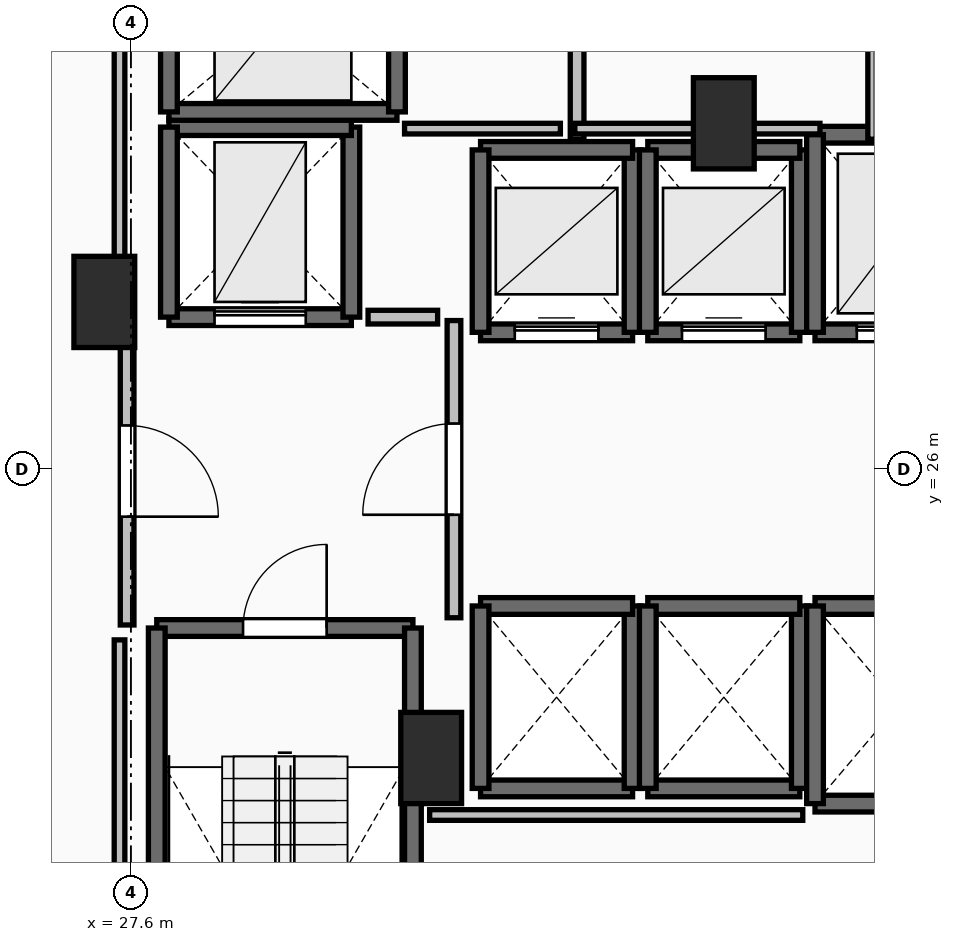
"""IFC4 building model, lengths in metres.
Left out: names, types, materials, properties, quantities, classifications, styles, units other than length and angle.
Written with IfcOpenShell. Run it as: python <this file> out.ifc"""

import sys

from ifc_helpers import new_model, si_unit, direction, frame, frame_2d, origin, origin_2d, place, context, subcontext, project, spatial, rectangle, extrude, element, fill, save


model = new_model("IFC4")
c1 = context("Model", 3, precision=1e-05, world=origin(), true_north=direction((0.0, 1.0)))
c2 = subcontext(c1, "Body", "Model", "MODEL_VIEW")
j1 = project(units=[si_unit("LENGTHUNIT", "METRE"), si_unit("PLANEANGLEUNIT", "RADIAN")], contexts=[c1])
p1 = place(None, origin())
s1 = spatial("IfcSite", under=j1, at=p1, CompositionType="ELEMENT")
p2 = place(p1, origin())
s2 = spatial("IfcBuilding", under=s1, at=p2, CompositionType="ELEMENT")
p3 = place(p2, frame((0.0, 0.0, 92.8)))
s3 = spatial("IfcBuildingStorey", under=s2, at=p3, CompositionType="ELEMENT", Elevation=92.8)
for number, where, z_axis, x_axis in (
    (1, (27.25, 28.2, 0.0), (0.0, 0.0, 1.0), (1.0, 0.0, 0.0)),
    (2, (31.55, 22.2, 0.0), (0.0, 0.0, 1.0), (1.0, 0.0, 0.0)),
    (3, (35.4, 30.55, 0.0), (0.0, 0.0, 1.0), (1.0, 0.0, 0.0)),
):
    element("IfcColumn", number, at=place(p3, frame(where, z_axis=z_axis, x_axis=x_axis)), inside=s3, PredefinedType="PILASTER", context=c2, shape_type="SweptSolid", body=[
        extrude(rectangle(XDim=0.8, YDim=1.2, at=origin_2d()), origin(), (0.0, 0.0, 1.0), 3.5),
    ])
p4 = place(p3, frame((27.94, 23.91, 0.0), z_axis=(0.0, 0.0, 1.0), x_axis=(1.0, 0.0, 0.0)))
e4 = element("IfcWall", 4, at=p4, inside=s3, PredefinedType="SOLIDWALL", context=c2, shape_type="SweptSolid", body=[
    extrude(rectangle(XDim=3.37, YDim=0.22, at=frame_2d((1.685, 0.0))), origin(), (0.0, 0.0, 1.0), 3.24),
])
p5 = place(p4, frame((1.135, 0.0, 0.0)))
e5 = element("IfcOpeningElement", 5, at=p5, cuts=e4, PredefinedType="OPENING", context=c2, shape_type="SweptSolid", body=[
    extrude(rectangle(XDim=1.1, YDim=2.15, at=frame_2d((0.55, 1.075))), frame((0.0, 0.125, 0.0), z_axis=(0.0, -1.0, 0.0), x_axis=(1.0, 0.0, 0.0)), (0.0, 0.0, 1.0), 0.25),
])
for number, where, z_axis, x_axis in (
    (6, (31.31, 23.91, 0.0), (0.0, 0.0, 1.0), (0.0, -1.0, 0.0)),
    (7, (27.94, 16.49, 0.0), (0.0, 0.0, 1.0), (0.0, 1.0, 0.0)),
):
    element("IfcWall", number, at=place(p3, frame(where, z_axis=z_axis, x_axis=x_axis)), inside=s3, PredefinedType="SOLIDWALL", context=c2, shape_type="SweptSolid", body=[
        extrude(rectangle(XDim=7.42, YDim=0.22, at=frame_2d((3.71, 0.0))), origin(), (0.0, 0.0, 1.0), 3.24),
    ])
p6 = place(p3, frame((32.2, 27.8, 0.0), z_axis=(0.0, 0.0, 1.0), x_axis=(1.0, 0.0, 0.0)))
e8 = element("IfcWall", 8, at=p6, inside=s3, PredefinedType="SOLIDWALL", context=c2, shape_type="SweptSolid", body=[
    extrude(rectangle(XDim=2.0, YDim=0.22, at=frame_2d((1.0, 0.0))), origin(), (0.0, 0.0, 1.0), 3.24),
])
p7 = place(p6, frame((0.45, 0.0, 0.0)))
e9 = element("IfcOpeningElement", 9, at=p7, cuts=e8, PredefinedType="OPENING", context=c2, shape_type="SweptSolid", body=[
    extrude(rectangle(XDim=1.1, YDim=2.2, at=frame_2d((0.55, 1.1))), frame((0.0, 0.125, 0.0), z_axis=(0.0, -1.0, 0.0), x_axis=(1.0, 0.0, 0.0)), (0.0, 0.0, 1.0), 0.25),
])
p8 = place(p3, frame((34.2, 27.8, 0.0), z_axis=(0.0, 0.0, 1.0), x_axis=(0.0, 1.0, 0.0)))
e10 = element("IfcWall", 10, at=p8, inside=s3, PredefinedType="SOLIDWALL", context=c2, shape_type="SweptSolid", body=[
    extrude(rectangle(XDim=2.4, YDim=0.22, at=frame_2d((1.2, 0.0))), origin(), (0.0, 0.0, 1.0), 3.24),
])
p9 = place(p3, frame((34.2, 30.2, 0.0), z_axis=(0.0, 0.0, 1.0), x_axis=(-1.0, 0.0, 0.0)))
e11 = element("IfcWall", 11, at=p9, inside=s3, PredefinedType="SOLIDWALL", context=c2, shape_type="SweptSolid", body=[
    extrude(rectangle(XDim=2.0, YDim=0.22, at=frame_2d((1.0, 0.0))), origin(), (0.0, 0.0, 1.0), 3.24),
])
p10 = place(p3, frame((32.2, 30.2, 0.0), z_axis=(0.0, 0.0, 1.0), x_axis=(0.0, -1.0, 0.0)))
e12 = element("IfcWall", 12, at=p10, inside=s3, PredefinedType="SOLIDWALL", context=c2, shape_type="SweptSolid", body=[
    extrude(rectangle(XDim=2.4, YDim=0.22, at=frame_2d((1.2, 0.0))), origin(), (0.0, 0.0, 1.0), 3.24),
])
p11 = place(p3, frame((34.4, 27.8, 0.0), z_axis=(0.0, 0.0, 1.0), x_axis=(1.0, 0.0, 0.0)))
e13 = element("IfcWall", 13, at=p11, inside=s3, PredefinedType="SOLIDWALL", context=c2, shape_type="SweptSolid", body=[
    extrude(rectangle(XDim=2.0, YDim=0.22, at=frame_2d((1.0, 0.0))), origin(), (0.0, 0.0, 1.0), 3.24),
])
p12 = place(p11, frame((0.45, 0.0, 0.0)))
e14 = element("IfcOpeningElement", 14, at=p12, cuts=e13, PredefinedType="OPENING", context=c2, shape_type="SweptSolid", body=[
    extrude(rectangle(XDim=1.1, YDim=2.2, at=frame_2d((0.55, 1.1))), frame((0.0, 0.125, 0.0), z_axis=(0.0, -1.0, 0.0), x_axis=(1.0, 0.0, 0.0)), (0.0, 0.0, 1.0), 0.25),
])
p13 = place(p3, frame((36.4, 27.8, 0.0), z_axis=(0.0, 0.0, 1.0), x_axis=(0.0, 1.0, 0.0)))
e15 = element("IfcWall", 15, at=p13, inside=s3, PredefinedType="SOLIDWALL", context=c2, shape_type="SweptSolid", body=[
    extrude(rectangle(XDim=2.4, YDim=0.22, at=frame_2d((1.2, 0.0))), origin(), (0.0, 0.0, 1.0), 3.24),
])
p14 = place(p3, frame((36.4, 30.2, 0.0), z_axis=(0.0, 0.0, 1.0), x_axis=(-1.0, 0.0, 0.0)))
e16 = element("IfcWall", 16, at=p14, inside=s3, PredefinedType="SOLIDWALL", context=c2, shape_type="SweptSolid", body=[
    extrude(rectangle(XDim=2.0, YDim=0.22, at=frame_2d((1.0, 0.0))), origin(), (0.0, 0.0, 1.0), 3.24),
])
p15 = place(p3, frame((34.4, 30.2, 0.0), z_axis=(0.0, 0.0, 1.0), x_axis=(0.0, -1.0, 0.0)))
e17 = element("IfcWall", 17, at=p15, inside=s3, PredefinedType="SOLIDWALL", context=c2, shape_type="SweptSolid", body=[
    extrude(rectangle(XDim=2.4, YDim=0.22, at=frame_2d((1.2, 0.0))), origin(), (0.0, 0.0, 1.0), 3.24),
])
p16 = place(p3, frame((36.6, 27.8, 0.0), z_axis=(0.0, 0.0, 1.0), x_axis=(1.0, 0.0, 0.0)))
e18 = element("IfcWall", 18, at=p16, inside=s3, PredefinedType="SOLIDWALL", context=c2, shape_type="SweptSolid", body=[
    extrude(rectangle(XDim=2.2, YDim=0.22, at=frame_2d((1.1, 0.0))), origin(), (0.0, 0.0, 1.0), 3.24),
])
p17 = place(p16, frame((0.55, 0.0, 0.0)))
e19 = element("IfcOpeningElement", 19, at=p17, cuts=e18, PredefinedType="OPENING", context=c2, shape_type="SweptSolid", body=[
    extrude(rectangle(XDim=1.1, YDim=2.2, at=frame_2d((0.55, 1.1))), frame((0.0, 0.125, 0.0), z_axis=(0.0, -1.0, 0.0), x_axis=(1.0, 0.0, 0.0)), (0.0, 0.0, 1.0), 0.25),
])
p18 = place(p3, frame((38.8, 30.4, 0.0), z_axis=(0.0, 0.0, 1.0), x_axis=(-1.0, 0.0, 0.0)))
e20 = element("IfcWall", 20, at=p18, inside=s3, PredefinedType="SOLIDWALL", context=c2, shape_type="SweptSolid", body=[
    extrude(rectangle(XDim=2.2, YDim=0.22, at=frame_2d((1.1, 0.0))), origin(), (0.0, 0.0, 1.0), 3.24),
])
p19 = place(p3, frame((36.6, 30.4, 0.0), z_axis=(0.0, 0.0, 1.0), x_axis=(0.0, -1.0, 0.0)))
e21 = element("IfcWall", 21, at=p19, inside=s3, PredefinedType="SOLIDWALL", context=c2, shape_type="SweptSolid", body=[
    extrude(rectangle(XDim=2.6, YDim=0.22, at=frame_2d((1.3, 0.0))), origin(), (0.0, 0.0, 1.0), 3.24),
])
p20 = place(p3, frame((32.2, 21.8, 0.0), z_axis=(0.0, 0.0, 1.0), x_axis=(1.0, 0.0, 0.0)))
e22 = element("IfcWall", 22, at=p20, inside=s3, PredefinedType="SOLIDWALL", context=c2, shape_type="SweptSolid", body=[
    extrude(rectangle(XDim=2.0, YDim=0.22, at=frame_2d((1.0, 0.0))), origin(), (0.0, 0.0, 1.0), 3.24),
])
p21 = place(p3, frame((34.2, 21.8, 0.0), z_axis=(0.0, 0.0, 1.0), x_axis=(0.0, 1.0, 0.0)))
e23 = element("IfcWall", 23, at=p21, inside=s3, PredefinedType="SOLIDWALL", context=c2, shape_type="SweptSolid", body=[
    extrude(rectangle(XDim=2.4, YDim=0.22, at=frame_2d((1.2, 0.0))), origin(), (0.0, 0.0, 1.0), 3.24),
])
p22 = place(p3, frame((34.2, 24.2, 0.0), z_axis=(0.0, 0.0, 1.0), x_axis=(-1.0, 0.0, 0.0)))
e24 = element("IfcWall", 24, at=p22, inside=s3, PredefinedType="SOLIDWALL", context=c2, shape_type="SweptSolid", body=[
    extrude(rectangle(XDim=2.0, YDim=0.22, at=frame_2d((1.0, 0.0))), origin(), (0.0, 0.0, 1.0), 3.24),
])
p23 = place(p3, frame((32.2, 24.2, 0.0), z_axis=(0.0, 0.0, 1.0), x_axis=(0.0, -1.0, 0.0)))
e25 = element("IfcWall", 25, at=p23, inside=s3, PredefinedType="SOLIDWALL", context=c2, shape_type="SweptSolid", body=[
    extrude(rectangle(XDim=2.4, YDim=0.22, at=frame_2d((1.2, 0.0))), origin(), (0.0, 0.0, 1.0), 3.24),
])
p24 = place(p3, frame((34.4, 21.8, 0.0), z_axis=(0.0, 0.0, 1.0), x_axis=(1.0, 0.0, 0.0)))
e26 = element("IfcWall", 26, at=p24, inside=s3, PredefinedType="SOLIDWALL", context=c2, shape_type="SweptSolid", body=[
    extrude(rectangle(XDim=2.0, YDim=0.22, at=frame_2d((1.0, 0.0))), origin(), (0.0, 0.0, 1.0), 3.24),
])
p25 = place(p3, frame((36.4, 21.8, 0.0), z_axis=(0.0, 0.0, 1.0), x_axis=(0.0, 1.0, 0.0)))
e27 = element("IfcWall", 27, at=p25, inside=s3, PredefinedType="SOLIDWALL", context=c2, shape_type="SweptSolid", body=[
    extrude(rectangle(XDim=2.4, YDim=0.22, at=frame_2d((1.2, 0.0))), origin(), (0.0, 0.0, 1.0), 3.24),
])
p26 = place(p3, frame((36.4, 24.2, 0.0), z_axis=(0.0, 0.0, 1.0), x_axis=(-1.0, 0.0, 0.0)))
e28 = element("IfcWall", 28, at=p26, inside=s3, PredefinedType="SOLIDWALL", context=c2, shape_type="SweptSolid", body=[
    extrude(rectangle(XDim=2.0, YDim=0.22, at=frame_2d((1.0, 0.0))), origin(), (0.0, 0.0, 1.0), 3.24),
])
p27 = place(p3, frame((34.4, 24.2, 0.0), z_axis=(0.0, 0.0, 1.0), x_axis=(0.0, -1.0, 0.0)))
e29 = element("IfcWall", 29, at=p27, inside=s3, PredefinedType="SOLIDWALL", context=c2, shape_type="SweptSolid", body=[
    extrude(rectangle(XDim=2.4, YDim=0.22, at=frame_2d((1.2, 0.0))), origin(), (0.0, 0.0, 1.0), 3.24),
])
for number, where, z_axis, x_axis in (
    (30, (36.6, 21.6, 0.0), (0.0, 0.0, 1.0), (1.0, 0.0, 0.0)),
    (31, (38.8, 24.2, 0.0), (0.0, 0.0, 1.0), (-1.0, 0.0, 0.0)),
):
    element("IfcWall", number, at=place(p3, frame(where, z_axis=z_axis, x_axis=x_axis)), inside=s3, PredefinedType="SOLIDWALL", context=c2, shape_type="SweptSolid", body=[
        extrude(rectangle(XDim=2.2, YDim=0.22, at=frame_2d((1.1, 0.0))), origin(), (0.0, 0.0, 1.0), 3.24),
    ])
p28 = place(p3, frame((36.6, 24.2, 0.0), z_axis=(0.0, 0.0, 1.0), x_axis=(0.0, -1.0, 0.0)))
e32 = element("IfcWall", 32, at=p28, inside=s3, PredefinedType="SOLIDWALL", context=c2, shape_type="SweptSolid", body=[
    extrude(rectangle(XDim=2.6, YDim=0.22, at=frame_2d((1.3, 0.0))), origin(), (0.0, 0.0, 1.0), 3.24),
])
p29 = place(p3, frame((28.1, 28.0, 0.0), z_axis=(0.0, 0.0, 1.0), x_axis=(1.0, 0.0, 0.0)))
e33 = element("IfcWall", 33, at=p29, inside=s3, PredefinedType="SHEAR", context=c2, shape_type="SweptSolid", body=[
    extrude(rectangle(XDim=2.4, YDim=0.22, at=frame_2d((1.2, 0.0))), origin(), (0.0, 0.0, 1.0), 3.24),
])
p30 = place(p29, frame((0.6, 0.0, 0.0)))
e34 = element("IfcOpeningElement", 34, at=p30, cuts=e33, PredefinedType="OPENING", context=c2, shape_type="SweptSolid", body=[
    extrude(rectangle(XDim=1.2, YDim=2.2, at=frame_2d((0.6, 1.1))), frame((0.0, 0.125, 0.0), z_axis=(0.0, -1.0, 0.0), x_axis=(1.0, 0.0, 0.0)), (0.0, 0.0, 1.0), 0.25),
])
p31 = place(p3, frame((30.5, 28.0, 0.0), z_axis=(0.0, 0.0, 1.0), x_axis=(0.0, 1.0, 0.0)))
e35 = element("IfcWall", 35, at=p31, inside=s3, PredefinedType="SHEAR", context=c2, shape_type="SweptSolid", body=[
    extrude(rectangle(XDim=2.5, YDim=0.22, at=frame_2d((1.25, 0.0))), origin(), (0.0, 0.0, 1.0), 3.24),
])
p32 = place(p3, frame((30.5, 30.5, 0.0), z_axis=(0.0, 0.0, 1.0), x_axis=(-1.0, 0.0, 0.0)))
e36 = element("IfcWall", 36, at=p32, inside=s3, PredefinedType="SHEAR", context=c2, shape_type="SweptSolid", body=[
    extrude(rectangle(XDim=2.4, YDim=0.22, at=frame_2d((1.2, 0.0))), origin(), (0.0, 0.0, 1.0), 3.24),
])
p33 = place(p3, frame((28.1, 30.5, 0.0), z_axis=(0.0, 0.0, 1.0), x_axis=(0.0, -1.0, 0.0)))
e37 = element("IfcWall", 37, at=p33, inside=s3, PredefinedType="SHEAR", context=c2, shape_type="SweptSolid", body=[
    extrude(rectangle(XDim=2.5, YDim=0.22, at=frame_2d((1.25, 0.0))), origin(), (0.0, 0.0, 1.0), 3.24),
])
p34 = place(p3, frame((28.1, 30.7, 0.0), z_axis=(0.0, 0.0, 1.0), x_axis=(1.0, 0.0, 0.0)))
e38 = element("IfcWall", 38, at=p34, inside=s3, PredefinedType="SOLIDWALL", context=c2, shape_type="SweptSolid", body=[
    extrude(rectangle(XDim=3.0, YDim=0.22, at=frame_2d((1.5, 0.0))), origin(), (0.0, 0.0, 1.0), 3.24),
])
for number, where, z_axis, x_axis in (
    (39, (31.1, 30.7, 0.0), (0.0, 0.0, 1.0), (0.0, 1.0, 0.0)),
    (40, (28.1, 33.2, 0.0), (0.0, 0.0, 1.0), (0.0, -1.0, 0.0)),
):
    element("IfcWall", number, at=place(p3, frame(where, z_axis=z_axis, x_axis=x_axis)), inside=s3, PredefinedType="SOLIDWALL", context=c2, shape_type="SweptSolid", body=[
        extrude(rectangle(XDim=2.5, YDim=0.22, at=frame_2d((1.25, 0.0))), origin(), (0.0, 0.0, 1.0), 3.24),
    ])
p35 = place(p3, frame((31.85, 24.045, 0.0), z_axis=(0.0, 0.0, 1.0), x_axis=(0.0, 1.0, 0.0)))
e41 = element("IfcWall", 41, at=p35, inside=s3, PredefinedType="PARTITIONING", context=c2, shape_type="SweptSolid", body=[
    extrude(rectangle(XDim=3.91, YDim=0.18, at=frame_2d((1.955, 0.0))), origin(), (0.0, 0.0, 1.0), 3.24),
])
p36 = place(p35, frame((1.355, 0.0, 0.0)))
e42 = element("IfcOpeningElement", 42, at=p36, cuts=e41, PredefinedType="OPENING", context=c2, shape_type="SweptSolid", body=[
    extrude(rectangle(XDim=1.2, YDim=2.15, at=frame_2d((0.6, 1.075))), frame((0.0, 0.105, 0.0), z_axis=(0.0, -1.0, 0.0), x_axis=(1.0, 0.0, 0.0)), (0.0, 0.0, 1.0), 0.21),
])
p37 = place(p3, frame((27.55, 28.0, 0.0), z_axis=(0.0, 0.0, 1.0), x_axis=(0.0, -1.0, 0.0)))
e43 = element("IfcWall", 43, at=p37, inside=s3, PredefinedType="PARTITIONING", context=c2, shape_type="SweptSolid", body=[
    extrude(rectangle(XDim=4.05, YDim=0.18, at=frame_2d((2.025, 0.0))), origin(), (0.0, 0.0, 1.0), 3.24),
])
p38 = place(p37, frame((1.425, 0.0, 0.0)))
e44 = element("IfcOpeningElement", 44, at=p38, cuts=e43, PredefinedType="OPENING", context=c2, shape_type="SweptSolid", body=[
    extrude(rectangle(XDim=1.2, YDim=2.15, at=frame_2d((0.6, 1.075))), frame((0.0, 0.105, 0.0), z_axis=(0.0, -1.0, 0.0), x_axis=(1.0, 0.0, 0.0)), (0.0, 0.0, 1.0), 0.21),
])
p39 = place(p3, frame((33.47, 30.34, 0.0), z_axis=(0.0, 0.0, 1.0), x_axis=(0.0, 1.0, 0.0)))
e45 = element("IfcWall", 45, at=p39, inside=s3, PredefinedType="PARTITIONING", context=c2, shape_type="SweptSolid", body=[
    extrude(rectangle(XDim=3.56, YDim=0.18, at=frame_2d((1.78, 0.0))), origin(), (0.0, 0.0, 1.0), 3.24),
])
p40 = place(p3, frame((37.35, 30.34, 0.0), z_axis=(0.0, 0.0, 1.0), x_axis=(0.0, 1.0, 0.0)))
e46 = element("IfcWall", 46, at=p40, inside=s3, PredefinedType="PARTITIONING", context=c2, shape_type="SweptSolid", body=[
    extrude(rectangle(XDim=3.56, YDim=0.11, at=frame_2d((1.78, 0.0))), origin(), (0.0, 0.0, 1.0), 2.432),
])
p41 = place(p3, frame((31.635, 28.0, 0.0), z_axis=(0.0, 0.0, 1.0), x_axis=(-1.0, 0.0, 0.0)))
e47 = element("IfcWall", 47, at=p41, inside=s3, PredefinedType="PARTITIONING", context=c2, shape_type="SweptSolid", body=[
    extrude(rectangle(XDim=0.915, YDim=0.18, at=frame_2d((0.458, 0.0))), origin(), (0.0, 0.0, 1.0), 3.24),
])
p42 = place(p3, frame((31.2, 30.48, 0.0), z_axis=(0.0, 0.0, 1.0), x_axis=(1.0, 0.0, 0.0)))
e48 = element("IfcWall", 48, at=p42, inside=s3, PredefinedType="PARTITIONING", context=c2, shape_type="SweptSolid", body=[
    extrude(rectangle(XDim=2.05, YDim=0.14, at=frame_2d((1.025, 0.0))), origin(), (0.0, 0.0, 1.0), 3.24),
])
p43 = place(p3, frame((33.44, 30.48, 0.0), z_axis=(0.0, 0.0, 1.0), x_axis=(1.0, 0.0, 0.0)))
e49 = element("IfcWall", 49, at=p43, inside=s3, PredefinedType="PARTITIONING", context=c2, shape_type="SweptSolid", body=[
    extrude(rectangle(XDim=3.225, YDim=0.14, at=frame_2d((1.613, 0.0))), origin(), (0.0, 0.0, 1.0), 2.432),
])
p44 = place(p3, frame((36.439, 21.45, 0.0), z_axis=(0.0, 0.0, 1.0), x_axis=(-1.0, 0.0, 0.0)))
e50 = element("IfcWall", 50, at=p44, inside=s3, PredefinedType="PARTITIONING", context=c2, shape_type="SweptSolid", body=[
    extrude(rectangle(XDim=4.909, YDim=0.14, at=frame_2d((2.455, 0.0))), origin(), (0.0, 0.0, 1.0), 3.24),
])
p45 = place(p3, frame((27.45, 16.24, 0.0), z_axis=(0.0, 0.0, 1.0), x_axis=(0.0, 1.0, 0.0)))
e51 = element("IfcWall", 51, at=p45, inside=s3, PredefinedType="PARTITIONING", context=c2, shape_type="SweptSolid", body=[
    extrude(rectangle(XDim=7.514, YDim=0.14, at=frame_2d((3.757, 0.0))), origin(), (0.0, 0.0, 1.0), 2.432),
])
p46 = place(p3, frame((27.45, 28.196, 0.0), z_axis=(0.0, 0.0, 1.0), x_axis=(0.0, 1.0, 0.0)))
e52 = element("IfcWall", 52, at=p46, inside=s3, PredefinedType="PARTITIONING", context=c2, shape_type="SweptSolid", body=[
    extrude(rectangle(XDim=5.254, YDim=0.14, at=frame_2d((2.627, 0.0))), origin(), (0.0, 0.0, 1.0), 2.432),
])
p47 = place(p5, origin())
e53 = element("IfcDoor", 53, at=p47, inside=s3, OperationType="SINGLE_SWING_RIGHT", PredefinedType="DOOR", context=c2, shape_type="SweptSolid", body=[
    extrude(rectangle(XDim=1.1, YDim=2.15, at=frame_2d((0.55, 1.075))), frame((0.0, 0.025, 0.0), z_axis=(0.0, -1.0, 0.0), x_axis=(1.0, 0.0, 0.0)), (0.0, 0.0, 1.0), 0.05),
])
fill(e5, e53)
p48 = place(p7, origin())
e54 = element("IfcDoor", 54, at=p48, inside=s3, OperationType="SLIDING_TO_LEFT", PredefinedType="DOOR", context=c2, shape_type="SweptSolid", body=[
    extrude(rectangle(XDim=1.1, YDim=2.2, at=frame_2d((0.55, 1.1))), frame((0.0, 0.025, 0.0), z_axis=(0.0, -1.0, 0.0), x_axis=(1.0, 0.0, 0.0)), (0.0, 0.0, 1.0), 0.05),
])
fill(e9, e54)
p49 = place(p12, origin())
e55 = element("IfcDoor", 55, at=p49, inside=s3, OperationType="SLIDING_TO_LEFT", PredefinedType="DOOR", context=c2, shape_type="SweptSolid", body=[
    extrude(rectangle(XDim=1.1, YDim=2.2, at=frame_2d((0.55, 1.1))), frame((0.0, 0.025, 0.0), z_axis=(0.0, -1.0, 0.0), x_axis=(1.0, 0.0, 0.0)), (0.0, 0.0, 1.0), 0.05),
])
fill(e14, e55)
p50 = place(p17, origin())
e56 = element("IfcDoor", 56, at=p50, inside=s3, OperationType="SLIDING_TO_LEFT", PredefinedType="DOOR", context=c2, shape_type="SweptSolid", body=[
    extrude(rectangle(XDim=1.1, YDim=2.2, at=frame_2d((0.55, 1.1))), frame((0.0, 0.025, 0.0), z_axis=(0.0, -1.0, 0.0), x_axis=(1.0, 0.0, 0.0)), (0.0, 0.0, 1.0), 0.05),
])
fill(e19, e56)
p51 = place(p30, origin())
e57 = element("IfcDoor", 57, at=p51, inside=s3, OperationType="SLIDING_TO_LEFT", PredefinedType="DOOR", context=c2, shape_type="SweptSolid", body=[
    extrude(rectangle(XDim=1.2, YDim=2.2, at=frame_2d((0.6, 1.1))), frame((0.0, 0.025, 0.0), z_axis=(0.0, -1.0, 0.0), x_axis=(1.0, 0.0, 0.0)), (0.0, 0.0, 1.0), 0.05),
])
fill(e34, e57)
p52 = place(p36, origin())
e58 = element("IfcDoor", 58, at=p52, inside=s3, OperationType="SINGLE_SWING_LEFT", PredefinedType="DOOR", context=c2, shape_type="SweptSolid", body=[
    extrude(rectangle(XDim=1.2, YDim=2.15, at=frame_2d((0.6, 1.075))), frame((0.0, 0.025, 0.0), z_axis=(0.0, -1.0, 0.0), x_axis=(1.0, 0.0, 0.0)), (0.0, 0.0, 1.0), 0.05),
])
fill(e42, e58)
p53 = place(p38, origin())
e59 = element("IfcDoor", 59, at=p53, inside=s3, OperationType="SINGLE_SWING_RIGHT", PredefinedType="DOOR", context=c2, shape_type="SweptSolid", body=[
    extrude(rectangle(XDim=1.2, YDim=2.15, at=frame_2d((0.6, 1.075))), frame((0.0, 0.025, 0.0), z_axis=(0.0, -1.0, 0.0), x_axis=(1.0, 0.0, 0.0)), (0.0, 0.0, 1.0), 0.05),
])
fill(e44, e59)
save(model, sys.argv[1])
